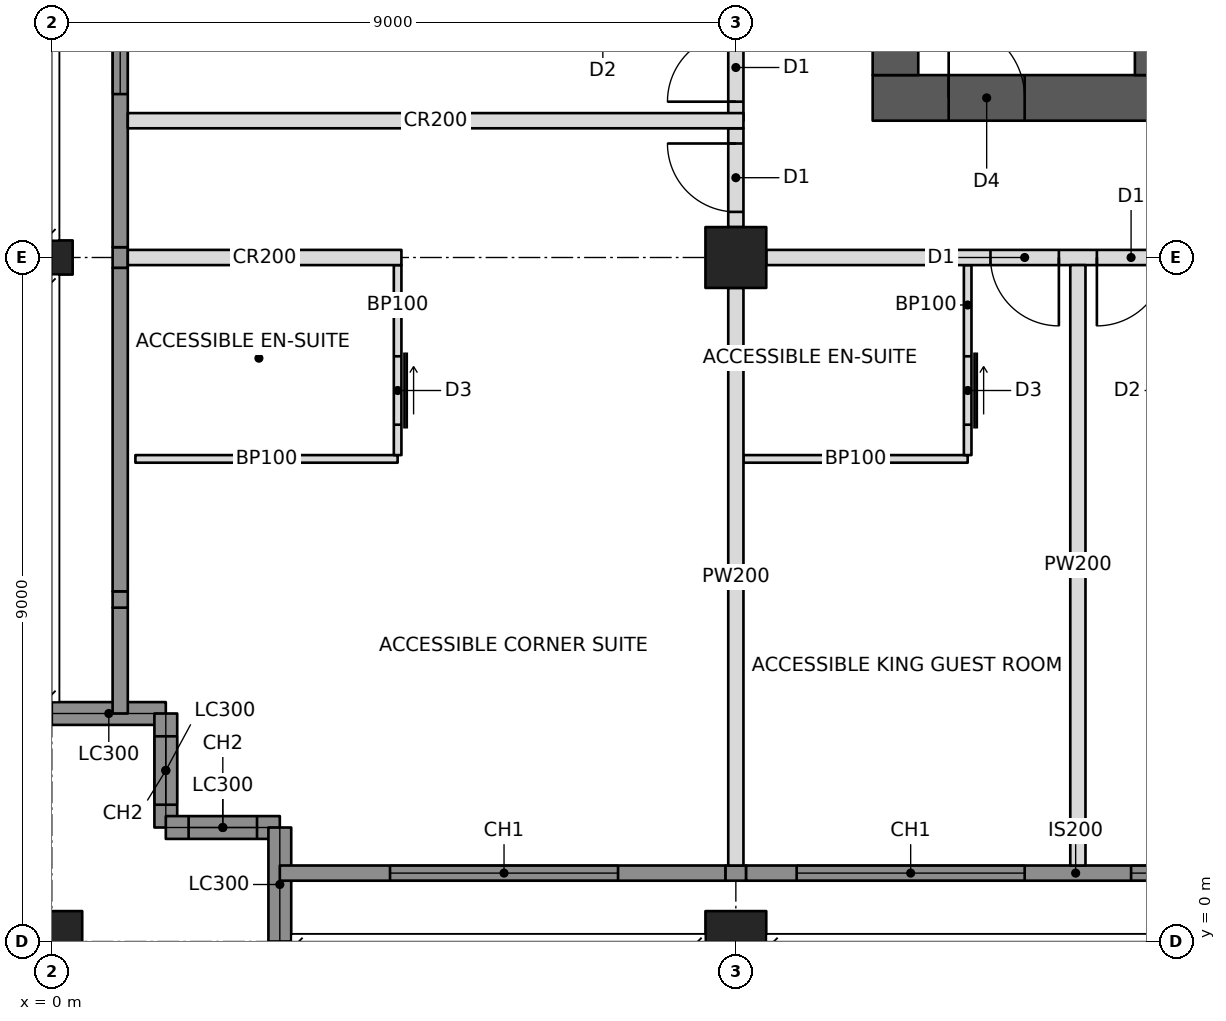
"""IFC4 building model, lengths in metres.
Left out: names, types, materials, properties, quantities, classifications, styles, units other than length and angle.
Written with IfcOpenShell. Run it as: python <this file> out.ifc"""

import sys

from ifc_helpers import new_model, si_unit, direction, frame, frame_2d, origin, origin_with_axes, origin_2d, place, context, subcontext, project, spatial, rectangle, hollow_rectangle, i_section, extrude, element, fill, save


model = new_model("IFC4")
c1 = context("Model", 3, precision=1e-05, world=origin(), true_north=direction((0.0, 1.0)))
c2 = subcontext(c1, "Body", "Model", "MODEL_VIEW")
j1 = project(units=[si_unit("LENGTHUNIT", "METRE"), si_unit("PLANEANGLEUNIT", "RADIAN")], contexts=[c1])
p1 = place(None, origin())
s1 = spatial("IfcSite", under=j1, at=p1, CompositionType="ELEMENT")
p2 = place(p1, origin())
s2 = spatial("IfcBuilding", under=s1, at=p2, CompositionType="ELEMENT")
p3 = place(p2, frame((0.0, 0.0, 167.2)))
s3 = spatial("IfcBuildingStorey", under=s2, at=p3, CompositionType="ELEMENT", Elevation=167.2)
p4 = place(p3, origin_with_axes())
e1 = element("IfcColumn", 1, at=p4, inside=s3, PredefinedType="COLUMN", context=c2, shape_type="SweptSolid", body=[
    extrude(hollow_rectangle(XDim=0.8, YDim=0.8, WallThickness=0.07, at=origin_2d()), origin(), (0.0, 0.0, 1.0), 3.4),
])
p5 = place(p3, frame((0.0, 9.0, 0.0), z_axis=(0.0, 0.0, 1.0), x_axis=(0.0, 1.0, 0.0)))
e2 = element("IfcColumn", 2, at=p5, inside=s3, PredefinedType="COLUMN", context=c2, shape_type="SweptSolid", body=[
    extrude(i_section(OverallWidth=0.449, OverallDepth=0.549, WebThickness=0.072, FlangeThickness=0.115, at=origin_2d()), origin(), (0.0, 0.0, 1.0), 3.4),
])
p6 = place(p3, frame((9.0, 0.0, 0.0), z_axis=(0.0, 0.0, 1.0), x_axis=(1.0, 0.0, 0.0)))
e3 = element("IfcColumn", 3, at=p6, inside=s3, PredefinedType="COLUMN", context=c2, shape_type="SweptSolid", body=[
    extrude(hollow_rectangle(XDim=0.8, YDim=0.8, WallThickness=0.07, at=origin_2d()), origin(), (0.0, 0.0, 1.0), 3.4),
])
p7 = place(p3, frame((9.0, 9.0, 0.0), z_axis=(0.0, 0.0, 1.0), x_axis=(1.0, 0.0, 0.0)))
e4 = element("IfcColumn", 4, at=p7, inside=s3, PredefinedType="COLUMN", context=c2, shape_type="SweptSolid", body=[
    extrude(hollow_rectangle(XDim=0.8, YDim=0.8, WallThickness=0.06, at=origin_2d()), origin(), (0.0, 0.0, 1.0), 3.4),
])
p8 = place(p3, frame((10.8, 11.1, 0.0), z_axis=(0.0, 0.0, 1.0), x_axis=(1.0, 0.0, 0.0)))
e5 = element("IfcWall", 5, at=p8, inside=s3, PredefinedType="SHEAR", context=c2, shape_type="SweptSolid", body=[
    extrude(rectangle(XDim=23.4, YDim=0.6, at=frame_2d((11.7, 0.0))), origin(), (0.0, 0.0, 1.0), 3.4),
])
p9 = place(p8, frame((1.0, 0.0, 0.0)))
e6 = element("IfcOpeningElement", 6, at=p9, cuts=e5, PredefinedType="OPENING", context=c2, shape_type="SweptSolid", body=[
    extrude(rectangle(XDim=1.0, YDim=2.1, at=frame_2d((0.5, 1.05))), frame((0.0, 0.31, 0.0), z_axis=(0.0, -1.0, 0.0), x_axis=(1.0, 0.0, 0.0)), (0.0, 0.0, 1.0), 0.62),
])
p10 = place(p8, frame((17.2, 0.0, 0.0)))
e7 = element("IfcOpeningElement", 7, at=p10, cuts=e5, PredefinedType="OPENING", context=c2, shape_type="SweptSolid", body=[
    extrude(rectangle(XDim=1.8, YDim=2.1, at=frame_2d((0.9, 1.05))), frame((0.0, 0.31, 0.0), z_axis=(0.0, -1.0, 0.0), x_axis=(1.0, 0.0, 0.0)), (0.0, 0.0, 1.0), 0.62),
])
p11 = place(p3, frame((11.1, 11.4, 0.0), z_axis=(0.0, 0.0, 1.0), x_axis=(0.0, 1.0, 0.0)))
e8 = element("IfcWall", 8, at=p11, inside=s3, PredefinedType="SHEAR", context=c2, shape_type="SweptSolid", body=[
    extrude(rectangle(XDim=13.2, YDim=0.6, at=frame_2d((6.6, 0.0))), origin(), (0.0, 0.0, 1.0), 3.4),
])
p12 = place(p3, frame((14.4, 11.4, 0.0), z_axis=(0.0, 0.0, 1.0), x_axis=(0.0, 1.0, 0.0)))
e9 = element("IfcWall", 9, at=p12, inside=s3, PredefinedType="SHEAR", context=c2, shape_type="SweptSolid", body=[
    extrude(rectangle(XDim=13.2, YDim=0.3, at=frame_2d((6.6, 0.0))), origin(), (0.0, 0.0, 1.0), 3.4),
])
p13 = place(p3, frame((0.0, 3.0, 0.0), z_axis=(0.0, 0.0, 1.0), x_axis=(1.0, 0.0, 0.0)))
e10 = element("IfcWall", 10, at=p13, inside=s3, PredefinedType="SOLIDWALL", context=c2, shape_type="SweptSolid", body=[
    extrude(rectangle(XDim=1.5, YDim=0.3, at=frame_2d((0.75, 0.0))), origin(), (0.0, 0.0, 1.0), 2.42),
])
p14 = place(p3, frame((1.5, 3.0, 0.0), z_axis=(0.0, 0.0, 1.0), x_axis=(0.0, -1.0, 0.0)))
e11 = element("IfcWall", 11, at=p14, inside=s3, PredefinedType="SOLIDWALL", context=c2, shape_type="SweptSolid", body=[
    extrude(rectangle(XDim=1.5, YDim=0.3, at=frame_2d((0.75, 0.0))), origin(), (0.0, 0.0, 1.0), 3.2),
])
p15 = place(p14, frame((0.3, 0.0, 0.6)))
e12 = element("IfcOpeningElement", 12, at=p15, cuts=e11, PredefinedType="OPENING", context=c2, shape_type="SweptSolid", body=[
    extrude(rectangle(XDim=0.9, YDim=2.2, at=frame_2d((0.45, 1.1))), frame((0.0, 0.16, 0.0), z_axis=(0.0, -1.0, 0.0), x_axis=(1.0, 0.0, 0.0)), (0.0, 0.0, 1.0), 0.32),
])
p16 = place(p3, frame((1.5, 1.5, 0.0), z_axis=(0.0, 0.0, 1.0), x_axis=(1.0, 0.0, 0.0)))
e13 = element("IfcWall", 13, at=p16, inside=s3, PredefinedType="SOLIDWALL", context=c2, shape_type="SweptSolid", body=[
    extrude(rectangle(XDim=1.5, YDim=0.3, at=frame_2d((0.75, 0.0))), origin(), (0.0, 0.0, 1.0), 3.2),
])
p17 = place(p16, frame((0.3, 0.0, 0.6)))
e14 = element("IfcOpeningElement", 14, at=p17, cuts=e13, PredefinedType="OPENING", context=c2, shape_type="SweptSolid", body=[
    extrude(rectangle(XDim=0.9, YDim=2.2, at=frame_2d((0.45, 1.1))), frame((0.0, 0.16, 0.0), z_axis=(0.0, -1.0, 0.0), x_axis=(1.0, 0.0, 0.0)), (0.0, 0.0, 1.0), 0.32),
])
p18 = place(p3, frame((3.0, 1.5, 0.0), z_axis=(0.0, 0.0, 1.0), x_axis=(0.0, -1.0, 0.0)))
e15 = element("IfcWall", 15, at=p18, inside=s3, PredefinedType="SOLIDWALL", context=c2, shape_type="SweptSolid", body=[
    extrude(rectangle(XDim=1.5, YDim=0.3, at=frame_2d((0.75, 0.0))), origin(), (0.0, 0.0, 1.0), 2.42),
])
p19 = place(p3, frame((3.0, 0.9, 0.0), z_axis=(0.0, 0.0, 1.0), x_axis=(1.0, 0.0, 0.0)))
e16 = element("IfcWall", 16, at=p19, inside=s3, PredefinedType="SOLIDWALL", context=c2, shape_type="SweptSolid", body=[
    extrude(rectangle(XDim=5.865, YDim=0.2, at=frame_2d((2.932, 0.0))), origin(), (0.0, 0.0, 1.0), 3.2),
])
p20 = place(p19, frame((1.45, 0.0, 0.6)))
e17 = element("IfcOpeningElement", 17, at=p20, cuts=e16, PredefinedType="OPENING", context=c2, shape_type="SweptSolid", body=[
    extrude(rectangle(XDim=3.0, YDim=2.2, at=frame_2d((1.5, 1.1))), frame((0.0, 0.11, 0.0), z_axis=(0.0, -1.0, 0.0), x_axis=(1.0, 0.0, 0.0)), (0.0, 0.0, 1.0), 0.22),
])
p21 = place(p3, frame((0.9, 3.0, 0.0), z_axis=(0.0, 0.0, 1.0), x_axis=(0.0, 1.0, 0.0)))
e18 = element("IfcWall", 18, at=p21, inside=s3, PredefinedType="SOLIDWALL", context=c2, shape_type="SweptSolid", body=[
    extrude(rectangle(XDim=1.393, YDim=0.2, at=frame_2d((0.696, 0.0))), origin(), (0.0, 0.0, 1.0), 3.2),
])
p22 = place(p3, frame((1.0, 9.0, 0.0), z_axis=(0.0, 0.0, 1.0), x_axis=(1.0, 0.0, 0.0)))
e19 = element("IfcWall", 19, at=p22, inside=s3, PredefinedType="PARTITIONING", context=c2, shape_type="SweptSolid", body=[
    extrude(rectangle(XDim=3.6, YDim=0.2, at=frame_2d((1.8, 0.0))), origin(), (0.0, 0.0, 1.0), 2.438),
])
p23 = place(p3, frame((9.4, 9.0, 0.0), z_axis=(0.0, 0.0, 1.0), x_axis=(1.0, 0.0, 0.0)))
e20 = element("IfcWall", 20, at=p23, inside=s3, PredefinedType="PARTITIONING", context=c2, shape_type="SweptSolid", body=[
    extrude(rectangle(XDim=8.2, YDim=0.2, at=frame_2d((4.1, 0.0))), origin(), (0.0, 0.0, 1.0), 2.405),
])
p24 = place(p23, frame((2.95, 0.0, 0.0)))
e21 = element("IfcOpeningElement", 21, at=p24, cuts=e20, PredefinedType="OPENING", context=c2, shape_type="SweptSolid", body=[
    extrude(rectangle(XDim=0.9, YDim=2.1, at=frame_2d((0.45, 1.05))), frame((0.0, 0.11, 0.0), z_axis=(0.0, -1.0, 0.0), x_axis=(1.0, 0.0, 0.0)), (0.0, 0.0, 1.0), 0.22),
])
p25 = place(p23, frame((4.35, 0.0, 0.0)))
e22 = element("IfcOpeningElement", 22, at=p25, cuts=e20, PredefinedType="OPENING", context=c2, shape_type="SweptSolid", body=[
    extrude(rectangle(XDim=0.9, YDim=2.1, at=frame_2d((0.45, 1.05))), frame((0.0, 0.11, 0.0), z_axis=(0.0, -1.0, 0.0), x_axis=(1.0, 0.0, 0.0)), (0.0, 0.0, 1.0), 0.22),
])
p26 = place(p3, frame((9.0, 10.8, 0.0), z_axis=(0.0, 0.0, 1.0), x_axis=(0.0, 1.0, 0.0)))
e23 = element("IfcWall", 23, at=p26, inside=s3, PredefinedType="PARTITIONING", context=c2, shape_type="SweptSolid", body=[
    extrude(rectangle(XDim=6.8, YDim=0.2, at=frame_2d((3.4, 0.0))), origin(), (0.0, 0.0, 1.0), 2.405),
])
p27 = place(p26, frame((0.25, 0.0, 0.0)))
e24 = element("IfcOpeningElement", 24, at=p27, cuts=e23, PredefinedType="OPENING", context=c2, shape_type="SweptSolid", body=[
    extrude(rectangle(XDim=0.9, YDim=2.1, at=frame_2d((0.45, 1.05))), frame((0.0, 0.11, 0.0), z_axis=(0.0, -1.0, 0.0), x_axis=(1.0, 0.0, 0.0)), (0.0, 0.0, 1.0), 0.22),
])
p28 = place(p26, frame((3.85, 0.0, 0.0)))
e25 = element("IfcOpeningElement", 25, at=p28, cuts=e23, PredefinedType="OPENING", context=c2, shape_type="SweptSolid", body=[
    extrude(rectangle(XDim=0.9, YDim=2.1, at=frame_2d((0.45, 1.05))), frame((0.0, 0.11, 0.0), z_axis=(0.0, -1.0, 0.0), x_axis=(1.0, 0.0, 0.0)), (0.0, 0.0, 1.0), 0.22),
])
p29 = place(p3, frame((1.0, 10.8, 0.0), z_axis=(0.0, 0.0, 1.0), x_axis=(1.0, 0.0, 0.0)))
e26 = element("IfcWall", 26, at=p29, inside=s3, PredefinedType="PARTITIONING", context=c2, shape_type="SweptSolid", body=[
    extrude(rectangle(XDim=8.1, YDim=0.2, at=frame_2d((4.05, 0.0))), origin(), (0.0, 0.0, 1.0), 2.404),
])
p30 = place(p3, frame((9.0, 8.6, 0.0), z_axis=(0.0, 0.0, 1.0), x_axis=(0.0, -1.0, 0.0)))
e27 = element("IfcWall", 27, at=p30, inside=s3, PredefinedType="PARTITIONING", context=c2, shape_type="SweptSolid", body=[
    extrude(rectangle(XDim=7.6, YDim=0.2, at=frame_2d((3.8, 0.0))), origin(), (0.0, 0.0, 1.0), 2.438),
])
p31 = place(p3, frame((13.5, 8.9, 0.0), z_axis=(0.0, 0.0, 1.0), x_axis=(0.0, -1.0, 0.0)))
e28 = element("IfcWall", 28, at=p31, inside=s3, PredefinedType="PARTITIONING", context=c2, shape_type="SweptSolid", body=[
    extrude(rectangle(XDim=7.9, YDim=0.2, at=frame_2d((3.95, 0.0))), origin(), (0.0, 0.0, 1.0), 2.404),
])
p32 = place(p3, frame((1.1, 6.35, 0.0), z_axis=(0.0, 0.0, 1.0), x_axis=(1.0, 0.0, 0.0)))
e29 = element("IfcWall", 29, at=p32, inside=s3, PredefinedType="PARTITIONING", context=c2, shape_type="SweptSolid", body=[
    extrude(rectangle(XDim=3.45, YDim=0.1, at=frame_2d((1.725, 0.0))), origin(), (0.0, 0.0, 1.0), 3.2),
])
p33 = place(p3, frame((4.55, 8.9, 0.0), z_axis=(0.0, 0.0, 1.0), x_axis=(0.0, -1.0, 0.0)))
e30 = element("IfcWall", 30, at=p33, inside=s3, PredefinedType="PARTITIONING", context=c2, shape_type="SweptSolid", body=[
    extrude(rectangle(XDim=2.5, YDim=0.1, at=frame_2d((1.25, 0.0))), origin(), (0.0, 0.0, 1.0), 2.438),
])
p34 = place(p33, frame((1.2, 0.0, 0.0)))
e31 = element("IfcOpeningElement", 31, at=p34, cuts=e30, PredefinedType="OPENING", context=c2, shape_type="SweptSolid", body=[
    extrude(rectangle(XDim=0.9, YDim=2.1, at=frame_2d((0.45, 1.05))), frame((0.0, 0.06, 0.0), z_axis=(0.0, -1.0, 0.0), x_axis=(1.0, 0.0, 0.0)), (0.0, 0.0, 1.0), 0.12),
])
p35 = place(p3, frame((9.1, 6.35, 0.0), z_axis=(0.0, 0.0, 1.0), x_axis=(1.0, 0.0, 0.0)))
e32 = element("IfcWall", 32, at=p35, inside=s3, PredefinedType="PARTITIONING", context=c2, shape_type="SweptSolid", body=[
    extrude(rectangle(XDim=2.95, YDim=0.1, at=frame_2d((1.475, 0.0))), origin(), (0.0, 0.0, 1.0), 2.438),
])
p36 = place(p3, frame((12.05, 8.9, 0.0), z_axis=(0.0, 0.0, 1.0), x_axis=(0.0, -1.0, 0.0)))
e33 = element("IfcWall", 33, at=p36, inside=s3, PredefinedType="PARTITIONING", context=c2, shape_type="SweptSolid", body=[
    extrude(rectangle(XDim=2.5, YDim=0.1, at=frame_2d((1.25, 0.0))), origin(), (0.0, 0.0, 1.0), 2.404),
])
p37 = place(p36, frame((1.2, 0.0, 0.0)))
e34 = element("IfcOpeningElement", 34, at=p37, cuts=e33, PredefinedType="OPENING", context=c2, shape_type="SweptSolid", body=[
    extrude(rectangle(XDim=0.9, YDim=2.1, at=frame_2d((0.45, 1.05))), frame((0.0, 0.06, 0.0), z_axis=(0.0, -1.0, 0.0), x_axis=(1.0, 0.0, 0.0)), (0.0, 0.0, 1.0), 0.12),
])
p38 = place(p3, frame((9.0, 9.4, 0.0), z_axis=(0.0, 0.0, 1.0), x_axis=(0.0, 1.0, 0.0)))
e35 = element("IfcWall", 35, at=p38, inside=s3, PredefinedType="PARTITIONING", context=c2, shape_type="SweptSolid", body=[
    extrude(rectangle(XDim=1.3, YDim=0.2, at=frame_2d((0.65, 0.0))), origin(), (0.0, 0.0, 1.0), 2.405),
])
p39 = place(p38, frame((0.2, 0.0, 0.0)))
e36 = element("IfcOpeningElement", 36, at=p39, cuts=e35, PredefinedType="OPENING", context=c2, shape_type="SweptSolid", body=[
    extrude(rectangle(XDim=0.9, YDim=2.1, at=frame_2d((0.45, 1.05))), frame((0.0, 0.11, 0.0), z_axis=(0.0, -1.0, 0.0), x_axis=(1.0, 0.0, 0.0)), (0.0, 0.0, 1.0), 0.22),
])
p40 = place(p3, frame((8.865, 0.9, 0.0), z_axis=(0.0, 0.0, 1.0), x_axis=(1.0, 0.0, 0.0)))
e37 = element("IfcWall", 37, at=p40, inside=s3, PredefinedType="SOLIDWALL", context=c2, shape_type="SweptSolid", body=[
    extrude(rectangle(XDim=0.271, YDim=0.2, at=frame_2d((0.135, 0.0))), origin(), (0.0, 0.0, 1.0), 2.438),
])
p41 = place(p3, frame((9.135, 0.9, 0.0), z_axis=(0.0, 0.0, 1.0), x_axis=(1.0, 0.0, 0.0)))
e38 = element("IfcWall", 38, at=p41, inside=s3, PredefinedType="SOLIDWALL", context=c2, shape_type="SweptSolid", body=[
    extrude(rectangle(XDim=8.671, YDim=0.2, at=frame_2d((4.335, 0.0))), origin(), (0.0, 0.0, 1.0), 3.2),
])
p42 = place(p41, frame((0.665, 0.0, 0.6)))
e39 = element("IfcOpeningElement", 39, at=p42, cuts=e38, PredefinedType="OPENING", context=c2, shape_type="SweptSolid", body=[
    extrude(rectangle(XDim=3.0, YDim=2.2, at=frame_2d((1.5, 1.1))), frame((0.0, 0.11, 0.0), z_axis=(0.0, -1.0, 0.0), x_axis=(1.0, 0.0, 0.0)), (0.0, 0.0, 1.0), 0.22),
])
p43 = place(p41, frame((5.065, 0.0, 0.6)))
e40 = element("IfcOpeningElement", 40, at=p43, cuts=e38, PredefinedType="OPENING", context=c2, shape_type="SweptSolid", body=[
    extrude(rectangle(XDim=3.0, YDim=2.2, at=frame_2d((1.5, 1.1))), frame((0.0, 0.11, 0.0), z_axis=(0.0, -1.0, 0.0), x_axis=(1.0, 0.0, 0.0)), (0.0, 0.0, 1.0), 0.22),
])
p44 = place(p3, frame((0.9, 4.393, 0.0), z_axis=(0.0, 0.0, 1.0), x_axis=(0.0, 1.0, 0.0)))
e41 = element("IfcWall", 41, at=p44, inside=s3, PredefinedType="SOLIDWALL", context=c2, shape_type="SweptSolid", body=[
    extrude(rectangle(XDim=0.215, YDim=0.2, at=frame_2d((0.107, 0.0))), origin(), (0.0, 0.0, 1.0), 2.661),
])
p45 = place(p3, frame((0.9, 4.607, 0.0), z_axis=(0.0, 0.0, 1.0), x_axis=(0.0, 1.0, 0.0)))
e42 = element("IfcWall", 42, at=p45, inside=s3, PredefinedType="SOLIDWALL", context=c2, shape_type="SweptSolid", body=[
    extrude(rectangle(XDim=4.257, YDim=0.2, at=frame_2d((2.129, 0.0))), origin(), (0.0, 0.0, 1.0), 3.2),
])
p46 = place(p3, frame((0.9, 8.865, 0.0), z_axis=(0.0, 0.0, 1.0), x_axis=(0.0, 1.0, 0.0)))
e43 = element("IfcWall", 43, at=p46, inside=s3, PredefinedType="SOLIDWALL", context=c2, shape_type="SweptSolid", body=[
    extrude(rectangle(XDim=0.271, YDim=0.2, at=frame_2d((0.135, 0.0))), origin(), (0.0, 0.0, 1.0), 2.438),
])
p47 = place(p3, frame((0.9, 9.135, 0.0), z_axis=(0.0, 0.0, 1.0), x_axis=(0.0, 1.0, 0.0)))
e44 = element("IfcWall", 44, at=p47, inside=s3, PredefinedType="SOLIDWALL", context=c2, shape_type="SweptSolid", body=[
    extrude(rectangle(XDim=8.671, YDim=0.2, at=frame_2d((4.335, 0.0))), origin(), (0.0, 0.0, 1.0), 3.2),
])
p48 = place(p47, frame((2.015, 0.0, 0.6)))
e45 = element("IfcOpeningElement", 45, at=p48, cuts=e44, PredefinedType="OPENING", context=c2, shape_type="SweptSolid", body=[
    extrude(rectangle(XDim=3.0, YDim=2.2, at=frame_2d((1.5, 1.1))), frame((0.0, 0.11, 0.0), z_axis=(0.0, -1.0, 0.0), x_axis=(1.0, 0.0, 0.0)), (0.0, 0.0, 1.0), 0.22),
])
p49 = place(p47, frame((5.515, 0.0, 0.6)))
e46 = element("IfcOpeningElement", 46, at=p49, cuts=e44, PredefinedType="OPENING", context=c2, shape_type="SweptSolid", body=[
    extrude(rectangle(XDim=3.0, YDim=2.2, at=frame_2d((1.5, 1.1))), frame((0.0, 0.11, 0.0), z_axis=(0.0, -1.0, 0.0), x_axis=(1.0, 0.0, 0.0)), (0.0, 0.0, 1.0), 0.22),
])
p50 = place(p15, origin())
e47 = element("IfcWindow", 47, at=p50, inside=s3, PartitioningType="SINGLE_PANEL", PredefinedType="WINDOW", context=c2, shape_type="SweptSolid", body=[
    extrude(rectangle(XDim=0.9, YDim=2.2, at=frame_2d((0.45, 1.1))), frame((0.0, 0.03, 0.0), z_axis=(0.0, -1.0, 0.0), x_axis=(1.0, 0.0, 0.0)), (0.0, 0.0, 1.0), 0.06),
])
fill(e12, e47)
p51 = place(p17, origin())
e48 = element("IfcWindow", 48, at=p51, inside=s3, PartitioningType="SINGLE_PANEL", PredefinedType="WINDOW", context=c2, shape_type="SweptSolid", body=[
    extrude(rectangle(XDim=0.9, YDim=2.2, at=frame_2d((0.45, 1.1))), frame((0.0, 0.03, 0.0), z_axis=(0.0, -1.0, 0.0), x_axis=(1.0, 0.0, 0.0)), (0.0, 0.0, 1.0), 0.06),
])
fill(e14, e48)
p52 = place(p20, origin())
e49 = element("IfcWindow", 49, at=p52, inside=s3, PartitioningType="TRIPLE_PANEL_VERTICAL", PredefinedType="WINDOW", context=c2, shape_type="SweptSolid", body=[
    extrude(rectangle(XDim=3.0, YDim=2.2, at=frame_2d((1.5, 1.1))), frame((0.0, 0.03, 0.0), z_axis=(0.0, -1.0, 0.0), x_axis=(1.0, 0.0, 0.0)), (0.0, 0.0, 1.0), 0.06),
])
fill(e17, e49)
p53 = place(p42, origin())
e50 = element("IfcWindow", 50, at=p53, inside=s3, PartitioningType="TRIPLE_PANEL_VERTICAL", PredefinedType="WINDOW", context=c2, shape_type="SweptSolid", body=[
    extrude(rectangle(XDim=3.0, YDim=2.2, at=frame_2d((1.5, 1.1))), frame((0.0, 0.03, 0.0), z_axis=(0.0, -1.0, 0.0), x_axis=(1.0, 0.0, 0.0)), (0.0, 0.0, 1.0), 0.06),
])
fill(e39, e50)
p54 = place(p43, origin())
e51 = element("IfcWindow", 51, at=p54, inside=s3, PartitioningType="TRIPLE_PANEL_VERTICAL", PredefinedType="WINDOW", context=c2, shape_type="SweptSolid", body=[
    extrude(rectangle(XDim=3.0, YDim=2.2, at=frame_2d((1.5, 1.1))), frame((0.0, 0.03, 0.0), z_axis=(0.0, -1.0, 0.0), x_axis=(1.0, 0.0, 0.0)), (0.0, 0.0, 1.0), 0.06),
])
fill(e40, e51)
p55 = place(p48, origin())
e52 = element("IfcWindow", 52, at=p55, inside=s3, PartitioningType="TRIPLE_PANEL_VERTICAL", PredefinedType="WINDOW", context=c2, shape_type="SweptSolid", body=[
    extrude(rectangle(XDim=3.0, YDim=2.2, at=frame_2d((1.5, 1.1))), frame((0.0, 0.03, 0.0), z_axis=(0.0, -1.0, 0.0), x_axis=(1.0, 0.0, 0.0)), (0.0, 0.0, 1.0), 0.06),
])
fill(e45, e52)
p56 = place(p34, origin())
e53 = element("IfcDoor", 53, at=p56, inside=s3, OperationType="SLIDING_TO_LEFT", PredefinedType="DOOR", context=c2, shape_type="SweptSolid", body=[
    extrude(rectangle(XDim=0.9, YDim=2.1, at=frame_2d((0.45, 1.05))), frame((0.0, 0.025, 0.0), z_axis=(0.0, -1.0, 0.0), x_axis=(1.0, 0.0, 0.0)), (0.0, 0.0, 1.0), 0.05),
])
fill(e31, e53)
p57 = place(p37, origin())
e54 = element("IfcDoor", 54, at=p57, inside=s3, OperationType="SLIDING_TO_LEFT", PredefinedType="DOOR", context=c2, shape_type="SweptSolid", body=[
    extrude(rectangle(XDim=0.9, YDim=2.1, at=frame_2d((0.45, 1.05))), frame((0.0, 0.025, 0.0), z_axis=(0.0, -1.0, 0.0), x_axis=(1.0, 0.0, 0.0)), (0.0, 0.0, 1.0), 0.05),
])
fill(e34, e54)
p58 = place(p24, frame((0.9, 0.0, 0.0), z_axis=(0.0, 0.0, 1.0), x_axis=(-1.0, 0.0, 0.0)))
e55 = element("IfcDoor", 55, at=p58, inside=s3, OperationType="SINGLE_SWING_LEFT", PredefinedType="DOOR", context=c2, shape_type="SweptSolid", body=[
    extrude(rectangle(XDim=0.9, YDim=2.1, at=frame_2d((0.45, 1.05))), frame((0.0, 0.025, 0.0), z_axis=(0.0, -1.0, 0.0), x_axis=(1.0, 0.0, 0.0)), (0.0, 0.0, 1.0), 0.05),
])
fill(e21, e55)
p59 = place(p25, frame((0.9, 0.0, 0.0), z_axis=(0.0, 0.0, 1.0), x_axis=(-1.0, 0.0, 0.0)))
e56 = element("IfcDoor", 56, at=p59, inside=s3, OperationType="SINGLE_SWING_RIGHT", PredefinedType="DOOR", context=c2, shape_type="SweptSolid", body=[
    extrude(rectangle(XDim=0.9, YDim=2.1, at=frame_2d((0.45, 1.05))), frame((0.0, 0.025, 0.0), z_axis=(0.0, -1.0, 0.0), x_axis=(1.0, 0.0, 0.0)), (0.0, 0.0, 1.0), 0.05),
])
fill(e22, e56)
p60 = place(p27, origin())
e57 = element("IfcDoor", 57, at=p60, inside=s3, OperationType="SINGLE_SWING_LEFT", PredefinedType="DOOR", context=c2, shape_type="SweptSolid", body=[
    extrude(rectangle(XDim=0.9, YDim=2.1, at=frame_2d((0.45, 1.05))), frame((0.0, 0.025, 0.0), z_axis=(0.0, -1.0, 0.0), x_axis=(1.0, 0.0, 0.0)), (0.0, 0.0, 1.0), 0.05),
])
fill(e24, e57)
p61 = place(p39, origin())
e58 = element("IfcDoor", 58, at=p61, inside=s3, OperationType="SINGLE_SWING_RIGHT", PredefinedType="DOOR", context=c2, shape_type="SweptSolid", body=[
    extrude(rectangle(XDim=0.9, YDim=2.1, at=frame_2d((0.45, 1.05))), frame((0.0, 0.025, 0.0), z_axis=(0.0, -1.0, 0.0), x_axis=(1.0, 0.0, 0.0)), (0.0, 0.0, 1.0), 0.05),
])
fill(e36, e58)
p62 = place(p9, origin())
e59 = element("IfcDoor", 59, at=p62, inside=s3, OperationType="SINGLE_SWING_LEFT", PredefinedType="DOOR", context=c2, shape_type="SweptSolid", body=[
    extrude(rectangle(XDim=1.0, YDim=2.1, at=frame_2d((0.5, 1.05))), frame((0.0, 0.025, 0.0), z_axis=(0.0, -1.0, 0.0), x_axis=(1.0, 0.0, 0.0)), (0.0, 0.0, 1.0), 0.05),
])
fill(e6, e59)
save(model, sys.argv[1])
